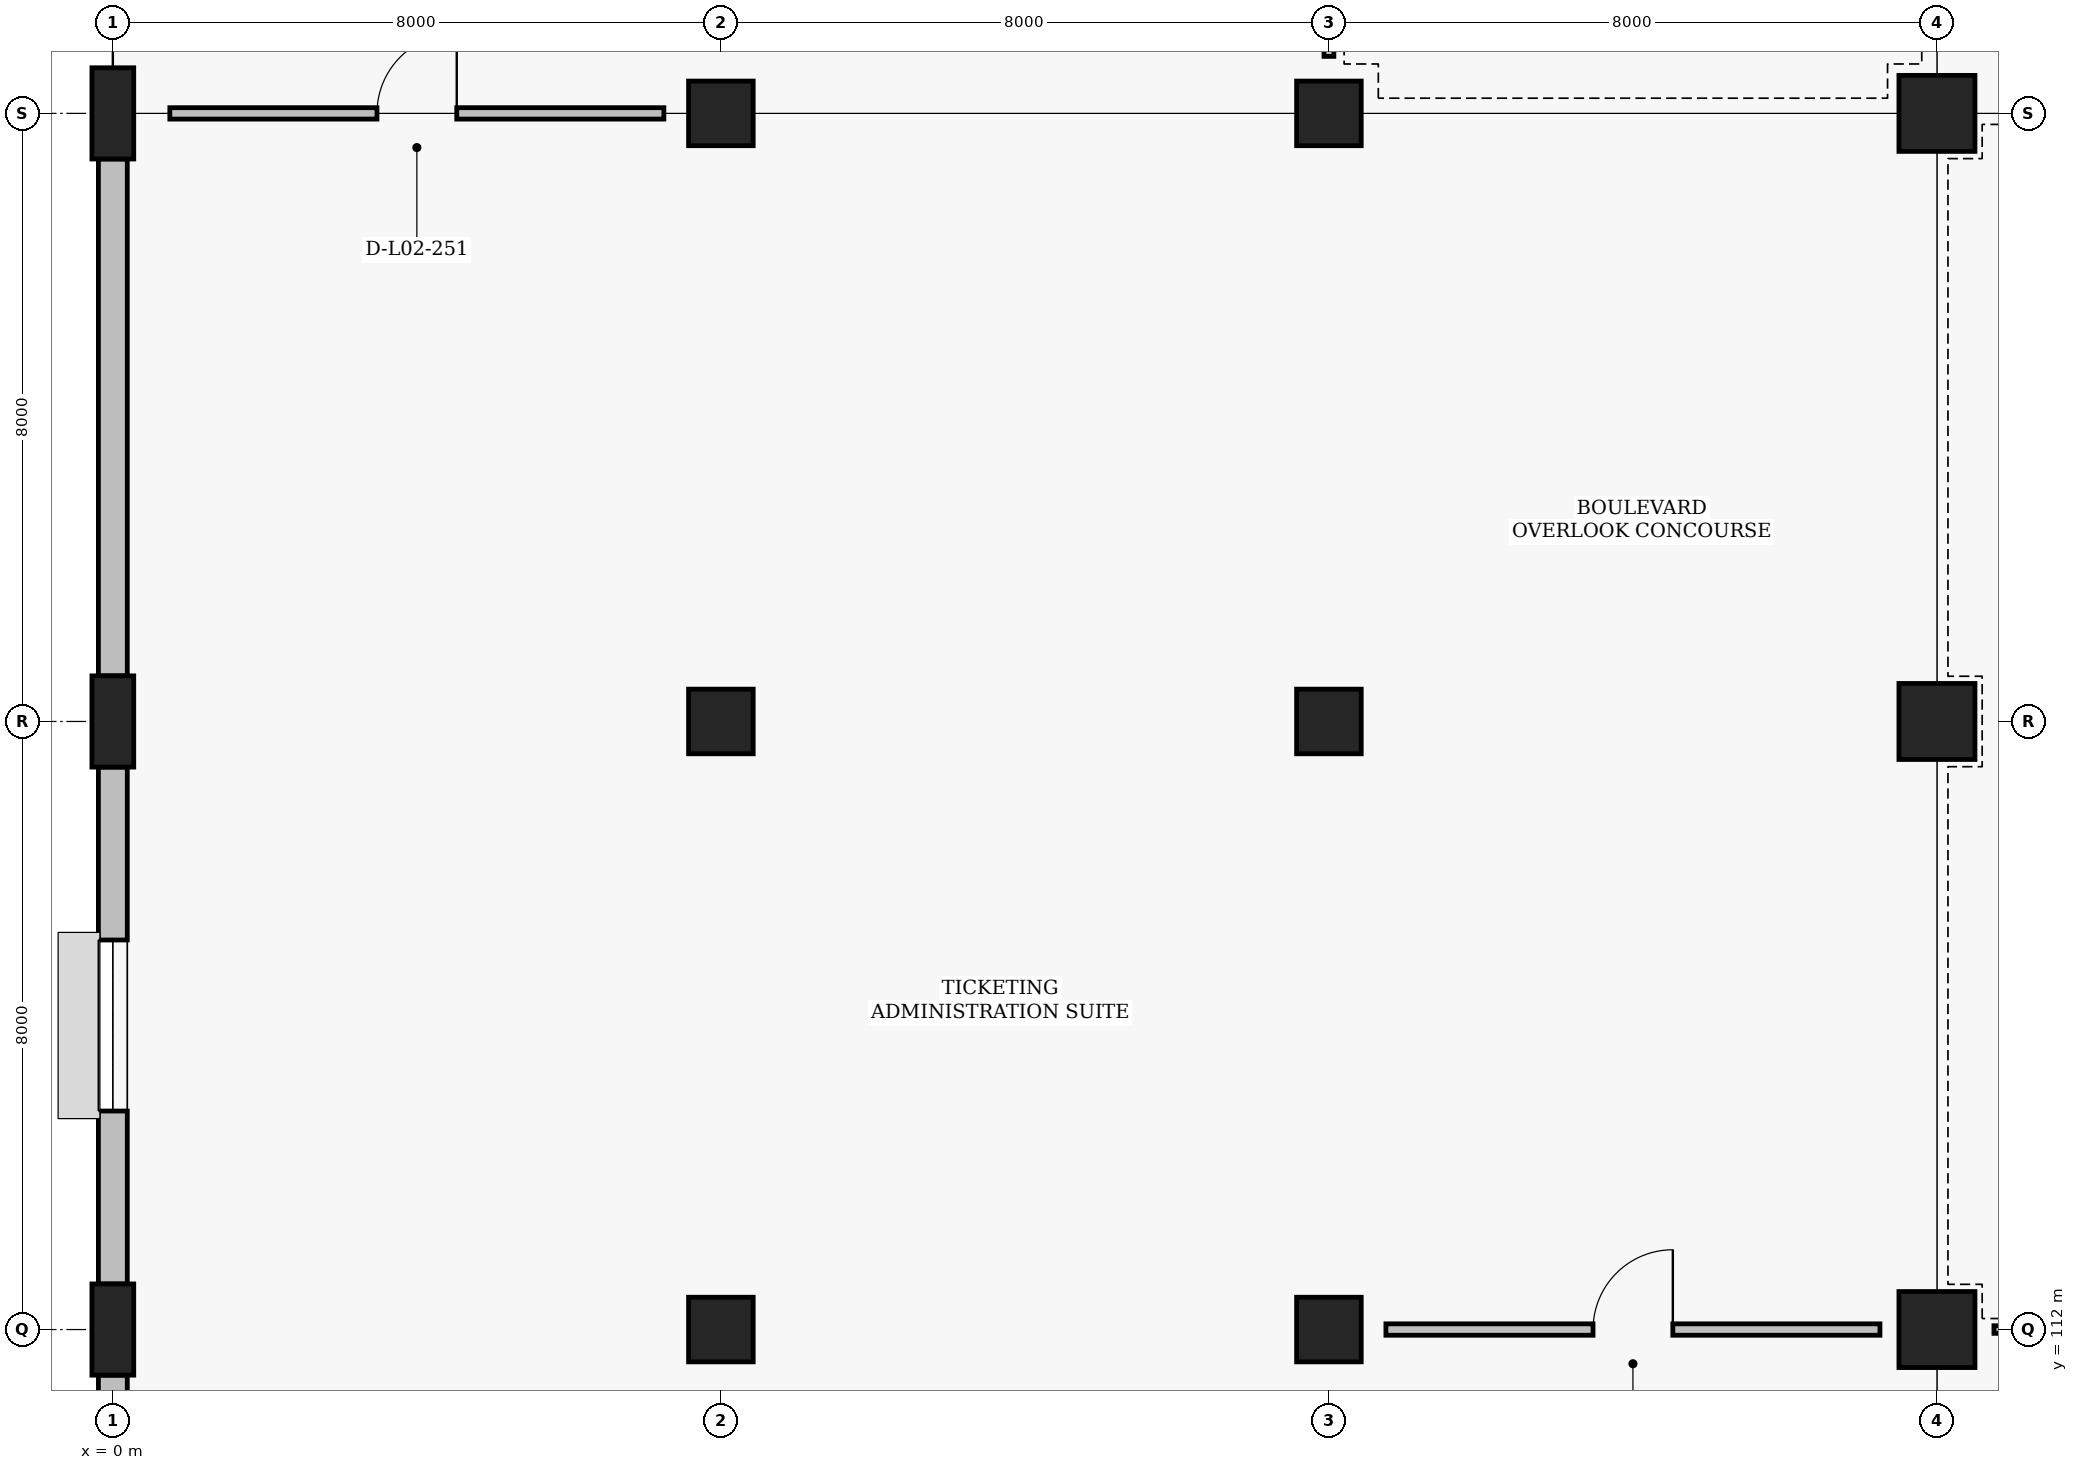
"""IFC4 building model, lengths in metres.
Left out: names, types, materials, properties, quantities, classifications, styles, units other than length and angle.
Written with IfcOpenShell. Run it as: python <this file> out.ifc"""

import sys

from ifc_helpers import new_model, si_unit, direction, frame, frame_2d, origin, origin_2d, place, context, subcontext, project, spatial, rectangle, circle, extrude, element, fill, save


model = new_model("IFC4")
c1 = context("Model", 3, precision=1e-05, world=origin(), true_north=direction((0.0, 1.0)))
c2 = subcontext(c1, "Body", "Model", "MODEL_VIEW")
j1 = project(units=[si_unit("LENGTHUNIT", "METRE"), si_unit("PLANEANGLEUNIT", "RADIAN")], contexts=[c1])
p1 = place(None, origin())
s1 = spatial("IfcSite", under=j1, at=p1, CompositionType="ELEMENT")
p2 = place(p1, origin())
s2 = spatial("IfcBuilding", under=s1, at=p2, CompositionType="ELEMENT")
p3 = place(p2, frame((0.0, 0.0, 4.8)))
s3 = spatial("IfcBuildingStorey", under=s2, at=p3, CompositionType="ELEMENT", Elevation=4.8)
for number, where, z_axis, x_axis in (
    (1, (0.0, 112.0, 0.0), (0.0, 0.0, 1.0), (1.0, 0.0, 0.0)),
    (2, (0.0, 120.0, 0.0), (0.0, 0.0, 1.0), (1.0, 0.0, 0.0)),
    (3, (0.0, 128.0, 0.0), (0.0, 0.0, 1.0), (1.0, 0.0, 0.0)),
):
    element("IfcColumn", number, at=place(p3, frame(where, z_axis=z_axis, x_axis=x_axis)), inside=s3, PredefinedType="PILASTER", context=c2, shape_type="SweptSolid", body=[
        extrude(rectangle(XDim=0.55, YDim=1.2, at=origin_2d()), origin(), (0.0, 0.0, 1.0), 4.8),
    ])
for number, where, z_axis, x_axis in (
    (4, (8.0, 112.0, 0.0), (0.0, 0.0, 1.0), (1.0, 0.0, 0.0)),
    (5, (8.0, 120.0, 0.0), (0.0, 0.0, 1.0), (1.0, 0.0, 0.0)),
    (6, (8.0, 128.0, 0.0), (0.0, 0.0, 1.0), (1.0, 0.0, 0.0)),
    (7, (16.0, 112.0, 0.0), (0.0, 0.0, 1.0), (1.0, 0.0, 0.0)),
    (8, (16.0, 120.0, 0.0), (0.0, 0.0, 1.0), (1.0, 0.0, 0.0)),
    (9, (16.0, 128.0, 0.0), (0.0, 0.0, 1.0), (1.0, 0.0, 0.0)),
):
    element("IfcColumn", number, at=place(p3, frame(where, z_axis=z_axis, x_axis=x_axis)), inside=s3, PredefinedType="COLUMN", context=c2, shape_type="SweptSolid", body=[
        extrude(circle(Radius=0.425, at=origin_2d()), origin(), (0.0, 0.0, 1.0), 4.8),
    ])
for number, where, z_axis, x_axis in (
    (10, (24.0, 112.0, 0.0), (0.0, 0.0, 1.0), (1.0, 0.0, 0.0)),
    (11, (24.0, 120.0, 0.0), (0.0, 0.0, 1.0), (1.0, 0.0, 0.0)),
    (12, (24.0, 128.0, 0.0), (0.0, 0.0, 1.0), (1.0, 0.0, 0.0)),
):
    element("IfcColumn", number, at=place(p3, frame(where, z_axis=z_axis, x_axis=x_axis)), inside=s3, PredefinedType="COLUMN", context=c2, shape_type="SweptSolid", body=[
        extrude(rectangle(XDim=1.0, YDim=1.0, at=origin_2d()), origin(), (0.0, 0.0, 1.0), 4.8),
    ])
p4 = place(p3, frame((0.0, 104.6, 0.0), z_axis=(0.0, 0.0, 1.0), x_axis=(0.0, 1.0, 0.0)))
e13 = element("IfcWall", 13, at=p4, inside=s3, PredefinedType="SOLIDWALL", context=c2, shape_type="SweptSolid", body=[
    extrude(rectangle(XDim=6.8, YDim=0.38, at=frame_2d((3.4, 0.0))), origin(), (0.0, 0.0, 1.0), 3.95),
])
p5 = place(p3, frame((0.0, 112.6, 0.0), z_axis=(0.0, 0.0, 1.0), x_axis=(0.0, 1.0, 0.0)))
e14 = element("IfcWall", 14, at=p5, inside=s3, PredefinedType="SOLIDWALL", context=c2, shape_type="SweptSolid", body=[
    extrude(rectangle(XDim=6.8, YDim=0.38, at=frame_2d((3.4, 0.0))), origin(), (0.0, 0.0, 1.0), 3.95),
])
p6 = place(p5, frame((2.275, 0.0, 0.95)))
e15 = element("IfcOpeningElement", 15, at=p6, cuts=e14, PredefinedType="OPENING", context=c2, shape_type="SweptSolid", body=[
    extrude(rectangle(XDim=2.25, YDim=1.9, at=frame_2d((1.125, 0.95))), frame((0.0, 0.2, 0.0), z_axis=(0.0, -1.0, 0.0), x_axis=(1.0, 0.0, 0.0)), (0.0, 0.0, 1.0), 0.4),
])
p7 = place(p3, frame((0.0, 120.6, 0.0), z_axis=(0.0, 0.0, 1.0), x_axis=(0.0, 1.0, 0.0)))
e16 = element("IfcWall", 16, at=p7, inside=s3, PredefinedType="SOLIDWALL", context=c2, shape_type="SweptSolid", body=[
    extrude(rectangle(XDim=6.8, YDim=0.38, at=frame_2d((3.4, 0.0))), origin(), (0.0, 0.0, 1.0), 3.95),
])
p8 = place(p3, frame((24.75, 112.0, 0.0), z_axis=(0.0, 0.0, 1.0), x_axis=(1.0, 0.0, 0.0)))
e17 = element("IfcWall", 17, at=p8, inside=s3, PredefinedType="PARTITIONING", context=c2, shape_type="SweptSolid", body=[
    extrude(rectangle(XDim=6.5, YDim=0.1, at=frame_2d((3.25, 0.0))), origin(), (0.0, 0.0, 1.0), 3.91),
])
p9 = place(p8, frame((2.775, 0.0, 0.0)))
e18 = element("IfcOpeningElement", 18, at=p9, cuts=e17, PredefinedType="OPENING", context=c2, shape_type="SweptSolid", body=[
    extrude(rectangle(XDim=0.95, YDim=2.1, at=frame_2d((0.475, 1.05))), frame((0.0, 0.06, 0.0), z_axis=(0.0, -1.0, 0.0), x_axis=(1.0, 0.0, 0.0)), (0.0, 0.0, 1.0), 0.12),
])
p10 = place(p3, frame((0.75, 128.0, 0.0), z_axis=(0.0, 0.0, 1.0), x_axis=(1.0, 0.0, 0.0)))
e19 = element("IfcWall", 19, at=p10, inside=s3, PredefinedType="PARTITIONING", context=c2, shape_type="SweptSolid", body=[
    extrude(rectangle(XDim=6.5, YDim=0.15, at=frame_2d((3.25, 0.0))), origin(), (0.0, 0.0, 1.0), 3.97),
])
p11 = place(p10, frame((2.725, 0.0, 0.0)))
e20 = element("IfcOpeningElement", 20, at=p11, cuts=e19, PredefinedType="OPENING", context=c2, shape_type="SweptSolid", body=[
    extrude(rectangle(XDim=1.05, YDim=2.15, at=frame_2d((0.525, 1.075))), frame((0.0, 0.085, 0.0), z_axis=(0.0, -1.0, 0.0), x_axis=(1.0, 0.0, 0.0)), (0.0, 0.0, 1.0), 0.17),
])
p12 = place(p3, frame((16.75, 112.0, 0.0), z_axis=(0.0, 0.0, 1.0), x_axis=(1.0, 0.0, 0.0)))
e21 = element("IfcWall", 21, at=p12, inside=s3, PredefinedType="PARTITIONING", context=c2, shape_type="SweptSolid", body=[
    extrude(rectangle(XDim=6.5, YDim=0.15, at=frame_2d((3.25, 0.0))), origin(), (0.0, 0.0, 1.0), 3.91),
])
p13 = place(p12, frame((2.725, 0.0, 0.0)))
e22 = element("IfcOpeningElement", 22, at=p13, cuts=e21, PredefinedType="OPENING", context=c2, shape_type="SweptSolid", body=[
    extrude(rectangle(XDim=1.05, YDim=2.15, at=frame_2d((0.525, 1.075))), frame((0.0, 0.085, 0.0), z_axis=(0.0, -1.0, 0.0), x_axis=(1.0, 0.0, 0.0)), (0.0, 0.0, 1.0), 0.17),
])
p14 = place(p3, frame((16.0, 128.75, 0.0), z_axis=(0.0, 0.0, 1.0), x_axis=(0.0, 1.0, 0.0)))
e23 = element("IfcWall", 23, at=p14, inside=s3, PredefinedType="PARTITIONING", context=c2, shape_type="SweptSolid", body=[
    extrude(rectangle(XDim=6.5, YDim=0.13, at=frame_2d((3.25, 0.0))), origin(), (0.0, 0.0, 1.0), 3.91),
])
p15 = place(p14, frame((2.75, 0.0, 0.0)))
e24 = element("IfcOpeningElement", 24, at=p15, cuts=e23, PredefinedType="OPENING", context=c2, shape_type="SweptSolid", body=[
    extrude(rectangle(XDim=1.0, YDim=2.1, at=frame_2d((0.5, 1.05))), frame((0.0, 0.075, 0.0), z_axis=(0.0, -1.0, 0.0), x_axis=(1.0, 0.0, 0.0)), (0.0, 0.0, 1.0), 0.15),
])
p16 = place(p6, origin())
e25 = element("IfcWindow", 25, at=p16, inside=s3, PartitioningType="SINGLE_PANEL", PredefinedType="WINDOW", context=c2, shape_type="SweptSolid", body=[
    extrude(rectangle(XDim=2.25, YDim=1.9, at=frame_2d((1.125, 0.95))), frame((0.0, 0.03, 0.0), z_axis=(0.0, -1.0, 0.0), x_axis=(1.0, 0.0, 0.0)), (0.0, 0.0, 1.0), 0.06),
])
fill(e15, e25)
p17 = place(p11, origin())
e26 = element("IfcDoor", 26, at=p17, inside=s3, OperationType="SINGLE_SWING_RIGHT", PredefinedType="DOOR", context=c2, shape_type="SweptSolid", body=[
    extrude(rectangle(XDim=1.05, YDim=2.15, at=frame_2d((0.525, 1.075))), frame((0.0, 0.025, 0.0), z_axis=(0.0, -1.0, 0.0), x_axis=(1.0, 0.0, 0.0)), (0.0, 0.0, 1.0), 0.05),
])
fill(e20, e26)
p18 = place(p13, origin())
e27 = element("IfcDoor", 27, at=p18, inside=s3, OperationType="SINGLE_SWING_RIGHT", PredefinedType="DOOR", context=c2, shape_type="SweptSolid", body=[
    extrude(rectangle(XDim=1.05, YDim=2.15, at=frame_2d((0.525, 1.075))), frame((0.0, 0.025, 0.0), z_axis=(0.0, -1.0, 0.0), x_axis=(1.0, 0.0, 0.0)), (0.0, 0.0, 1.0), 0.05),
])
fill(e22, e27)
save(model, sys.argv[1])
